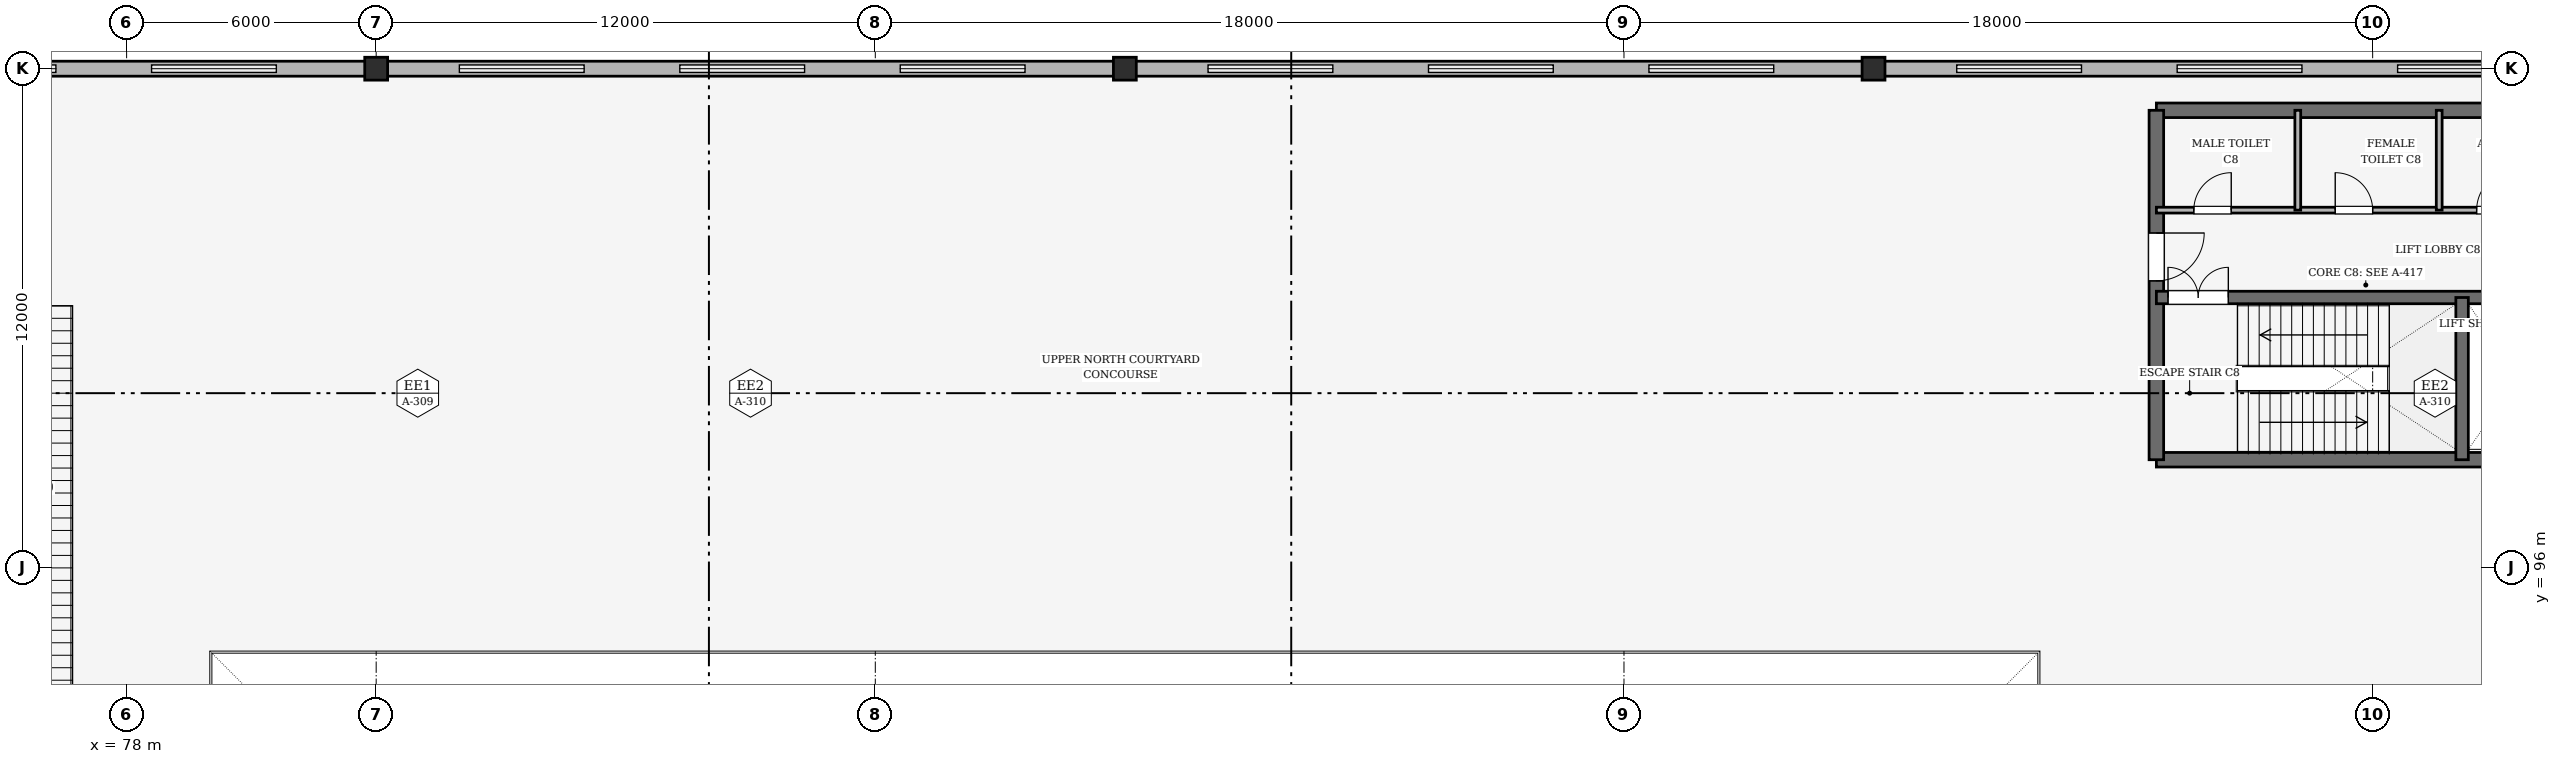
"""IFC4 building model, lengths in metres.
Left out: names, types, materials, properties, quantities, classifications, styles, units other than length and angle.
Written with IfcOpenShell. Run it as: python <this file> out.ifc"""

import sys

from ifc_helpers import new_model, si_unit, direction, frame, frame_2d, origin, origin_2d, place, context, subcontext, project, spatial, rectangle, extrude, element, fill, save


model = new_model("IFC4")
c1 = context("Model", 3, precision=1e-05, world=origin(), true_north=direction((0.0, 1.0)))
c2 = subcontext(c1, "Body", "Model", "MODEL_VIEW")
j1 = project(units=[si_unit("LENGTHUNIT", "METRE"), si_unit("PLANEANGLEUNIT", "RADIAN")], contexts=[c1])
p1 = place(None, origin())
s1 = spatial("IfcSite", under=j1, at=p1, CompositionType="ELEMENT")
p2 = place(p1, origin())
s2 = spatial("IfcBuilding", under=s1, at=p2, CompositionType="ELEMENT")
p3 = place(p2, frame((0.0, 0.0, 5.4)))
s3 = spatial("IfcBuildingStorey", under=s2, at=p3, CompositionType="ELEMENT", Elevation=5.4)
for number, where, z_axis, x_axis in (
    (1, (84.0, 108.0, 0.0), (0.0, 0.0, 1.0), (1.0, 0.0, 0.0)),
    (2, (102.0, 108.0, 0.0), (0.0, 0.0, 1.0), (1.0, 0.0, 0.0)),
    (3, (120.0, 108.0, 0.0), (0.0, 0.0, 1.0), (1.0, 0.0, 0.0)),
):
    element("IfcColumn", number, at=place(p3, frame(where, z_axis=z_axis, x_axis=x_axis)), inside=s3, PredefinedType="COLUMN", context=c2, shape_type="SweptSolid", body=[
        extrude(rectangle(XDim=0.55, YDim=0.55, at=origin_2d()), origin(), (0.0, 0.0, 1.0), 5.4),
    ])
for number, where, z_axis, x_axis in (
    (4, (84.0, 108.0, 0.0), (0.0, 0.0, 1.0), (-1.0, 0.0, 0.0)),
    (5, (102.0, 108.0, 0.0), (0.0, 0.0, 1.0), (-1.0, 0.0, 0.0)),
    (6, (120.0, 108.0, 0.0), (0.0, 0.0, 1.0), (-1.0, 0.0, 0.0)),
    (7, (138.0, 108.0, 0.0), (0.0, 0.0, 1.0), (-1.0, 0.0, 0.0)),
):
    element("IfcWall", number, at=place(p3, frame(where, z_axis=z_axis, x_axis=x_axis)), inside=s3, PredefinedType="SOLIDWALL", context=c2, shape_type="SweptSolid", body=[
        extrude(rectangle(XDim=18.0, YDim=0.36, at=frame_2d((9.0, 0.0))), origin(), (0.0, 0.0, 1.0), 0.6),
    ])
for number, where, z_axis, x_axis in (
    (8, (126.8, 98.6, 0.0), (0.0, 0.0, 1.0), (1.0, 0.0, 0.0)),
    (9, (137.0, 107.0, 0.0), (0.0, 0.0, 1.0), (-1.0, 0.0, 0.0)),
):
    element("IfcWall", number, at=place(p3, frame(where, z_axis=z_axis, x_axis=x_axis)), inside=s3, PredefinedType="SHEAR", context=c2, shape_type="SweptSolid", body=[
        extrude(rectangle(XDim=10.2, YDim=0.35, at=frame_2d((5.1, 0.0))), origin(), (0.0, 0.0, 1.0), 5.4),
    ])
p4 = place(p3, frame((126.8, 107.0, 0.0), z_axis=(0.0, 0.0, 1.0), x_axis=(0.0, -1.0, 0.0)))
e10 = element("IfcWall", 10, at=p4, inside=s3, PredefinedType="SHEAR", context=c2, shape_type="SweptSolid", body=[
    extrude(rectangle(XDim=8.4, YDim=0.35, at=frame_2d((4.2, 0.0))), origin(), (0.0, 0.0, 1.0), 5.4),
])
p5 = place(p4, frame((2.95, 0.0, 0.0)))
e11 = element("IfcOpeningElement", 11, at=p5, cuts=e10, PredefinedType="OPENING", context=c2, shape_type="SweptSolid", body=[
    extrude(rectangle(XDim=1.15, YDim=2.15, at=frame_2d((0.575, 1.075))), frame((0.0, 0.185, 0.0), z_axis=(0.0, -1.0, 0.0), x_axis=(1.0, 0.0, 0.0)), (0.0, 0.0, 1.0), 0.37),
])
p6 = place(p3, frame((126.8, 102.5, 0.0), z_axis=(0.0, 0.0, 1.0), x_axis=(1.0, 0.0, 0.0)))
e12 = element("IfcWall", 12, at=p6, inside=s3, PredefinedType="SHEAR", context=c2, shape_type="SweptSolid", body=[
    extrude(rectangle(XDim=10.2, YDim=0.3, at=frame_2d((5.1, 0.0))), origin(), (0.0, 0.0, 1.0), 5.4),
])
p7 = place(p6, frame((0.28, 0.0, 0.0)))
e13 = element("IfcOpeningElement", 13, at=p7, cuts=e12, PredefinedType="OPENING", context=c2, shape_type="SweptSolid", body=[
    extrude(rectangle(XDim=1.45, YDim=2.15, at=frame_2d((0.725, 1.075))), frame((0.0, 0.16, 0.0), z_axis=(0.0, -1.0, 0.0), x_axis=(1.0, 0.0, 0.0)), (0.0, 0.0, 1.0), 0.32),
])
p8 = place(p6, frame((8.225, 0.0, 0.0)))
e14 = element("IfcOpeningElement", 14, at=p8, cuts=e12, PredefinedType="OPENING", context=c2, shape_type="SweptSolid", body=[
    extrude(rectangle(XDim=1.1, YDim=2.15, at=frame_2d((0.55, 1.075))), frame((0.0, 0.16, 0.0), z_axis=(0.0, -1.0, 0.0), x_axis=(1.0, 0.0, 0.0)), (0.0, 0.0, 1.0), 0.32),
])
p9 = place(p3, frame((134.15, 98.6, 0.0), z_axis=(0.0, 0.0, 1.0), x_axis=(0.0, 1.0, 0.0)))
e15 = element("IfcWall", 15, at=p9, inside=s3, PredefinedType="SHEAR", context=c2, shape_type="SweptSolid", body=[
    extrude(rectangle(XDim=3.9, YDim=0.3, at=frame_2d((1.95, 0.0))), origin(), (0.0, 0.0, 1.0), 5.4),
])
p10 = place(p3, frame((126.8, 104.6, 0.0), z_axis=(0.0, 0.0, 1.0), x_axis=(1.0, 0.0, 0.0)))
e16 = element("IfcWall", 16, at=p10, inside=s3, PredefinedType="PARTITIONING", context=c2, shape_type="SweptSolid", body=[
    extrude(rectangle(XDim=10.2, YDim=0.14, at=frame_2d((5.1, 0.0))), origin(), (0.0, 0.0, 1.0), 4.5),
])
p11 = place(p10, frame((0.9, 0.0, 0.0)))
e17 = element("IfcOpeningElement", 17, at=p11, cuts=e16, PredefinedType="OPENING", context=c2, shape_type="SweptSolid", body=[
    extrude(rectangle(XDim=0.9, YDim=2.1, at=frame_2d((0.45, 1.05))), frame((0.0, 0.08, 0.0), z_axis=(0.0, -1.0, 0.0), x_axis=(1.0, 0.0, 0.0)), (0.0, 0.0, 1.0), 0.16),
])
p12 = place(p10, frame((4.3, 0.0, 0.0)))
e18 = element("IfcOpeningElement", 18, at=p12, cuts=e16, PredefinedType="OPENING", context=c2, shape_type="SweptSolid", body=[
    extrude(rectangle(XDim=0.9, YDim=2.1, at=frame_2d((0.45, 1.05))), frame((0.0, 0.08, 0.0), z_axis=(0.0, -1.0, 0.0), x_axis=(1.0, 0.0, 0.0)), (0.0, 0.0, 1.0), 0.16),
])
p13 = place(p10, frame((7.7, 0.0, 0.0)))
e19 = element("IfcOpeningElement", 19, at=p13, cuts=e16, PredefinedType="OPENING", context=c2, shape_type="SweptSolid", body=[
    extrude(rectangle(XDim=0.95, YDim=2.1, at=frame_2d((0.475, 1.05))), frame((0.0, 0.08, 0.0), z_axis=(0.0, -1.0, 0.0), x_axis=(1.0, 0.0, 0.0)), (0.0, 0.0, 1.0), 0.16),
])
for number, where, z_axis, x_axis in (
    (20, (130.2, 104.6, 0.0), (0.0, 0.0, 1.0), (0.0, 1.0, 0.0)),
    (21, (133.6, 104.6, 0.0), (0.0, 0.0, 1.0), (0.0, 1.0, 0.0)),
):
    element("IfcWall", number, at=place(p3, frame(where, z_axis=z_axis, x_axis=x_axis)), inside=s3, PredefinedType="PARTITIONING", context=c2, shape_type="SweptSolid", body=[
        extrude(rectangle(XDim=2.4, YDim=0.14, at=frame_2d((1.2, 0.0))), origin(), (0.0, 0.0, 1.0), 4.5),
    ])
p14 = place(p5, origin())
e22 = element("IfcDoor", 22, at=p14, inside=s3, OperationType="SINGLE_SWING_LEFT", PredefinedType="DOOR", context=c2, shape_type="SweptSolid", body=[
    extrude(rectangle(XDim=1.15, YDim=2.15, at=frame_2d((0.575, 1.075))), frame((0.0, 0.025, 0.0), z_axis=(0.0, -1.0, 0.0), x_axis=(1.0, 0.0, 0.0)), (0.0, 0.0, 1.0), 0.05),
])
fill(e11, e22)
p15 = place(p7, origin())
e23 = element("IfcDoor", 23, at=p15, inside=s3, OperationType="DOUBLE_DOOR_SINGLE_SWING", PredefinedType="DOOR", context=c2, shape_type="SweptSolid", body=[
    extrude(rectangle(XDim=1.45, YDim=2.15, at=frame_2d((0.725, 1.075))), frame((0.0, 0.025, 0.0), z_axis=(0.0, -1.0, 0.0), x_axis=(1.0, 0.0, 0.0)), (0.0, 0.0, 1.0), 0.05),
])
fill(e13, e23)
p16 = place(p11, origin())
e24 = element("IfcDoor", 24, at=p16, inside=s3, OperationType="SINGLE_SWING_RIGHT", PredefinedType="DOOR", context=c2, shape_type="SweptSolid", body=[
    extrude(rectangle(XDim=0.9, YDim=2.1, at=frame_2d((0.45, 1.05))), frame((0.0, 0.025, 0.0), z_axis=(0.0, -1.0, 0.0), x_axis=(1.0, 0.0, 0.0)), (0.0, 0.0, 1.0), 0.05),
])
fill(e17, e24)
p17 = place(p12, origin())
e25 = element("IfcDoor", 25, at=p17, inside=s3, OperationType="SINGLE_SWING_LEFT", PredefinedType="DOOR", context=c2, shape_type="SweptSolid", body=[
    extrude(rectangle(XDim=0.9, YDim=2.1, at=frame_2d((0.45, 1.05))), frame((0.0, 0.025, 0.0), z_axis=(0.0, -1.0, 0.0), x_axis=(1.0, 0.0, 0.0)), (0.0, 0.0, 1.0), 0.05),
])
fill(e18, e25)
p18 = place(p13, origin())
e26 = element("IfcDoor", 26, at=p18, inside=s3, OperationType="SINGLE_SWING_RIGHT", PredefinedType="DOOR", context=c2, shape_type="SweptSolid", body=[
    extrude(rectangle(XDim=0.95, YDim=2.1, at=frame_2d((0.475, 1.05))), frame((0.0, 0.025, 0.0), z_axis=(0.0, -1.0, 0.0), x_axis=(1.0, 0.0, 0.0)), (0.0, 0.0, 1.0), 0.05),
])
fill(e19, e26)
save(model, sys.argv[1])
